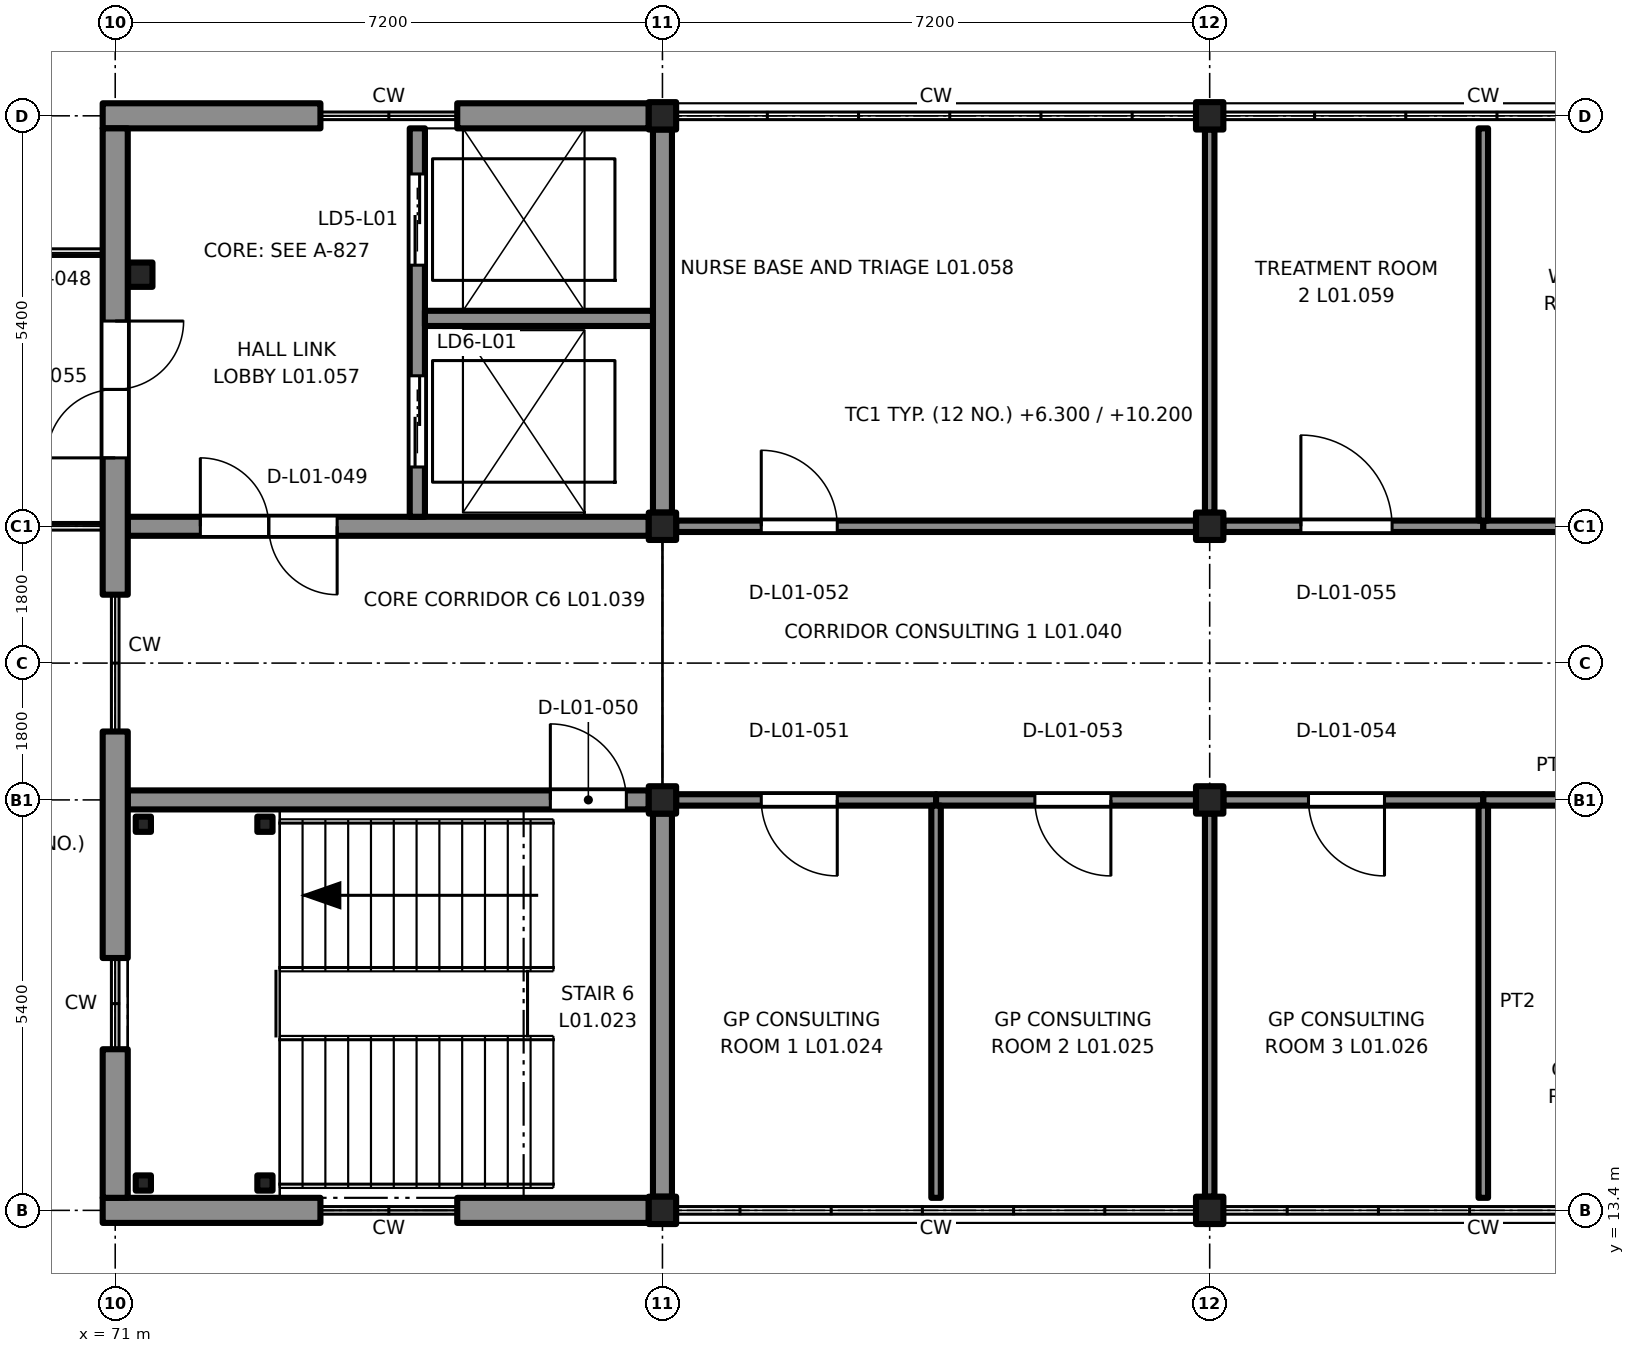
"""IFC4 building model, lengths in metres.
Left out: names, types, materials, properties, quantities, classifications, styles, units other than length and angle.
Written with IfcOpenShell. Run it as: python <this file> out.ifc"""

import sys

from ifc_helpers import new_model, si_unit, direction, frame, frame_2d, origin, origin_2d, place, context, subcontext, project, spatial, rectangle, extrude, element, fill, save


model = new_model("IFC4")
c1 = context("Model", 3, precision=1e-05, world=origin(), true_north=direction((0.0, 1.0)))
c2 = subcontext(c1, "Body", "Model", "MODEL_VIEW")
j1 = project(units=[si_unit("LENGTHUNIT", "METRE"), si_unit("PLANEANGLEUNIT", "RADIAN")], contexts=[c1])
p1 = place(None, origin())
s1 = spatial("IfcSite", under=j1, at=p1, CompositionType="ELEMENT")
p2 = place(p1, origin())
s2 = spatial("IfcBuilding", under=s1, at=p2, CompositionType="ELEMENT")
p3 = place(p2, frame((0.0, 0.0, 6.3)))
s3 = spatial("IfcBuildingStorey", under=s2, at=p3, CompositionType="ELEMENT", Elevation=6.3)
for number, where, z_axis, x_axis in (
    (1, (78.2, 13.4, 0.0), (0.0, 0.0, 1.0), (1.0, 0.0, 0.0)),
    (2, (78.2, 18.8, 0.0), (0.0, 0.0, 1.0), (1.0, 0.0, 0.0)),
    (3, (78.2, 22.4, 0.0), (0.0, 0.0, 1.0), (1.0, 0.0, 0.0)),
    (4, (78.2, 27.8, 0.0), (0.0, 0.0, 1.0), (1.0, 0.0, 0.0)),
    (5, (85.4, 13.4, 0.0), (0.0, 0.0, 1.0), (1.0, 0.0, 0.0)),
    (6, (85.4, 18.8, 0.0), (0.0, 0.0, 1.0), (1.0, 0.0, 0.0)),
    (7, (85.4, 22.4, 0.0), (0.0, 0.0, 1.0), (1.0, 0.0, 0.0)),
    (8, (85.4, 27.8, 0.0), (0.0, 0.0, 1.0), (1.0, 0.0, 0.0)),
):
    element("IfcColumn", number, at=place(p3, frame(where, z_axis=z_axis, x_axis=x_axis)), inside=s3, PredefinedType="COLUMN", context=c2, shape_type="SweptSolid", body=[
        extrude(rectangle(XDim=0.36, YDim=0.36, at=origin_2d()), origin(), (0.0, 0.0, 1.0), 3.9),
    ])
p4 = place(p3, frame((71.33, 25.71, 0.0), z_axis=(0.0, 0.0, 1.0), x_axis=(1.0, 0.0, 0.0)))
e9 = element("IfcColumn", 9, at=p4, inside=s3, PredefinedType="COLUMN", context=c2, shape_type="SweptSolid", body=[
    extrude(rectangle(XDim=0.32, YDim=0.32, at=origin_2d()), origin(), (0.0, 0.0, 1.0), 2.505),
])
p5 = place(p3, frame((71.165, 18.8, 0.0), z_axis=(0.0, 0.0, 1.0), x_axis=(1.0, 0.0, 0.0)))
e10 = element("IfcWall", 10, at=p5, inside=s3, PredefinedType="SHEAR", context=c2, shape_type="SweptSolid", body=[
    extrude(rectangle(XDim=6.855, YDim=0.25, at=frame_2d((3.427, 0.0))), origin(), (0.0, 0.0, 1.0), 3.65),
])
p6 = place(p5, frame((5.56, 0.0, 0.0)))
e11 = element("IfcOpeningElement", 11, at=p6, cuts=e10, PredefinedType="OPENING", context=c2, shape_type="SweptSolid", body=[
    extrude(rectangle(XDim=1.0, YDim=2.1, at=frame_2d((0.5, 1.05))), frame((0.0, 0.135, 0.0), z_axis=(0.0, -1.0, 0.0), x_axis=(1.0, 0.0, 0.0)), (0.0, 0.0, 1.0), 0.27),
])
p7 = place(p3, frame((78.2, 13.58, 0.0), z_axis=(0.0, 0.0, 1.0), x_axis=(0.0, 1.0, 0.0)))
e12 = element("IfcWall", 12, at=p7, inside=s3, PredefinedType="SHEAR", context=c2, shape_type="SweptSolid", body=[
    extrude(rectangle(XDim=5.04, YDim=0.25, at=frame_2d((2.52, 0.0))), origin(), (0.0, 0.0, 1.0), 3.65),
])
p8 = place(p3, frame((71.165, 22.4, 0.0), z_axis=(0.0, 0.0, 1.0), x_axis=(1.0, 0.0, 0.0)))
e13 = element("IfcWall", 13, at=p8, inside=s3, PredefinedType="SHEAR", context=c2, shape_type="SweptSolid", body=[
    extrude(rectangle(XDim=6.855, YDim=0.25, at=frame_2d((3.427, 0.0))), origin(), (0.0, 0.0, 1.0), 3.65),
])
p9 = place(p8, frame((0.955, 0.0, 0.0)))
e14 = element("IfcOpeningElement", 14, at=p9, cuts=e13, PredefinedType="OPENING", context=c2, shape_type="SweptSolid", body=[
    extrude(rectangle(XDim=1.8, YDim=2.1, at=frame_2d((0.9, 1.05))), frame((0.0, 0.135, 0.0), z_axis=(0.0, -1.0, 0.0), x_axis=(1.0, 0.0, 0.0)), (0.0, 0.0, 1.0), 0.27),
])
p10 = place(p3, frame((78.2, 22.58, 0.0), z_axis=(0.0, 0.0, 1.0), x_axis=(0.0, 1.0, 0.0)))
e15 = element("IfcWall", 15, at=p10, inside=s3, PredefinedType="SHEAR", context=c2, shape_type="SweptSolid", body=[
    extrude(rectangle(XDim=5.04, YDim=0.25, at=frame_2d((2.52, 0.0))), origin(), (0.0, 0.0, 1.0), 3.65),
])
p11 = place(p3, frame((74.975, 22.525, 0.0), z_axis=(0.0, 0.0, 1.0), x_axis=(0.0, 1.0, 0.0)))
e16 = element("IfcWall", 16, at=p11, inside=s3, PredefinedType="SHEAR", context=c2, shape_type="SweptSolid", body=[
    extrude(rectangle(XDim=5.11, YDim=0.2, at=frame_2d((2.555, 0.0))), origin(), (0.0, 0.0, 1.0), 3.65),
])
p12 = place(p11, frame((3.31, 0.0, 0.0)))
e17 = element("IfcOpeningElement", 17, at=p12, cuts=e16, PredefinedType="OPENING", context=c2, shape_type="SweptSolid", body=[
    extrude(rectangle(XDim=1.2, YDim=2.1, at=frame_2d((0.6, 1.05))), frame((0.0, 0.11, 0.0), z_axis=(0.0, -1.0, 0.0), x_axis=(1.0, 0.0, 0.0)), (0.0, 0.0, 1.0), 0.22),
])
p13 = place(p11, frame((0.655, 0.0, 0.0)))
e18 = element("IfcOpeningElement", 18, at=p13, cuts=e16, PredefinedType="OPENING", context=c2, shape_type="SweptSolid", body=[
    extrude(rectangle(XDim=1.2, YDim=2.1, at=frame_2d((0.6, 1.05))), frame((0.0, 0.11, 0.0), z_axis=(0.0, -1.0, 0.0), x_axis=(1.0, 0.0, 0.0)), (0.0, 0.0, 1.0), 0.22),
])
p14 = place(p3, frame((78.075, 25.135, 0.0), z_axis=(0.0, 0.0, 1.0), x_axis=(-1.0, 0.0, 0.0)))
e19 = element("IfcWall", 19, at=p14, inside=s3, PredefinedType="SHEAR", context=c2, shape_type="SweptSolid", body=[
    extrude(rectangle(XDim=3.0, YDim=0.2, at=frame_2d((1.5, 0.0))), origin(), (0.0, 0.0, 1.0), 3.65),
])
for number, where, z_axis, x_axis in (
    (20, (71.37, 13.76, 0.0), (0.0, 0.0, 1.0), (1.0, 0.0, 0.0)),
    (21, (71.37, 18.48, 0.0), (0.0, 0.0, 1.0), (1.0, 0.0, 0.0)),
    (22, (72.97, 13.76, 0.0), (0.0, 0.0, 1.0), (1.0, 0.0, 0.0)),
    (23, (72.97, 18.48, 0.0), (0.0, 0.0, 1.0), (1.0, 0.0, 0.0)),
):
    element("IfcColumn", number, at=place(p3, frame(where, z_axis=z_axis, x_axis=x_axis)), inside=s3, PredefinedType="COLUMN", context=c2, shape_type="SweptSolid", body=[
        extrude(rectangle(XDim=0.2, YDim=0.2, at=origin_2d()), origin(), (0.0, 0.0, 1.0), 3.9),
    ])
p15 = place(p3, frame((73.7, 13.4, 0.0), z_axis=(0.0, 0.0, 1.0), x_axis=(-1.0, 0.0, 0.0)))
e24 = element("IfcWall", 24, at=p15, inside=s3, PredefinedType="SOLIDWALL", context=c2, shape_type="SweptSolid", body=[
    extrude(rectangle(XDim=2.865, YDim=0.33, at=frame_2d((1.433, 0.0))), origin(), (0.0, 0.0, 1.0), 3.22),
])
p16 = place(p3, frame((78.02, 13.4, 0.0), z_axis=(0.0, 0.0, 1.0), x_axis=(-1.0, 0.0, 0.0)))
e25 = element("IfcWall", 25, at=p16, inside=s3, PredefinedType="SOLIDWALL", context=c2, shape_type="SweptSolid", body=[
    extrude(rectangle(XDim=2.52, YDim=0.33, at=frame_2d((1.26, 0.0))), origin(), (0.0, 0.0, 1.0), 3.22),
])
p17 = place(p3, frame((70.835, 27.8, 0.0), z_axis=(0.0, 0.0, 1.0), x_axis=(1.0, 0.0, 0.0)))
e26 = element("IfcWall", 26, at=p17, inside=s3, PredefinedType="SOLIDWALL", context=c2, shape_type="SweptSolid", body=[
    extrude(rectangle(XDim=2.865, YDim=0.33, at=frame_2d((1.433, 0.0))), origin(), (0.0, 0.0, 1.0), 3.22),
])
p18 = place(p3, frame((75.5, 27.8, 0.0), z_axis=(0.0, 0.0, 1.0), x_axis=(1.0, 0.0, 0.0)))
e27 = element("IfcWall", 27, at=p18, inside=s3, PredefinedType="SOLIDWALL", context=c2, shape_type="SweptSolid", body=[
    extrude(rectangle(XDim=2.52, YDim=0.33, at=frame_2d((1.26, 0.0))), origin(), (0.0, 0.0, 1.0), 3.22),
])
p19 = place(p3, frame((71.0, 13.565, 0.0), z_axis=(0.0, 0.0, 1.0), x_axis=(0.0, 1.0, 0.0)))
e28 = element("IfcWall", 28, at=p19, inside=s3, PredefinedType="SOLIDWALL", context=c2, shape_type="SweptSolid", body=[
    extrude(rectangle(XDim=1.955, YDim=0.33, at=frame_2d((0.978, 0.0))), origin(), (0.0, 0.0, 1.0), 3.2),
])
p20 = place(p3, frame((71.0, 16.72, 0.0), z_axis=(0.0, 0.0, 1.0), x_axis=(0.0, 1.0, 0.0)))
e29 = element("IfcWall", 29, at=p20, inside=s3, PredefinedType="SOLIDWALL", context=c2, shape_type="SweptSolid", body=[
    extrude(rectangle(XDim=2.98, YDim=0.33, at=frame_2d((1.49, 0.0))), origin(), (0.0, 0.0, 1.0), 3.2),
])
p21 = place(p3, frame((71.0, 21.5, 0.0), z_axis=(0.0, 0.0, 1.0), x_axis=(0.0, 1.0, 0.0)))
e30 = element("IfcWall", 30, at=p21, inside=s3, PredefinedType="SOLIDWALL", context=c2, shape_type="SweptSolid", body=[
    extrude(rectangle(XDim=6.135, YDim=0.33, at=frame_2d((3.067, 0.0))), origin(), (0.0, 0.0, 1.0), 3.2),
])
p22 = place(p21, frame((1.8, 0.0, 0.0)))
e31 = element("IfcOpeningElement", 31, at=p22, cuts=e30, PredefinedType="OPENING", context=c2, shape_type="SweptSolid", body=[
    extrude(rectangle(XDim=1.8, YDim=2.4, at=frame_2d((0.9, 1.2))), frame((0.0, 0.175, 0.0), z_axis=(0.0, -1.0, 0.0), x_axis=(1.0, 0.0, 0.0)), (0.0, 0.0, 1.0), 0.35),
])
p23 = place(p3, frame((81.8, 18.8, 0.0), z_axis=(0.0, 0.0, 1.0), x_axis=(-1.0, 0.0, 0.0)))
e32 = element("IfcWall", 32, at=p23, inside=s3, PredefinedType="PARTITIONING", context=c2, shape_type="SweptSolid", body=[
    extrude(rectangle(XDim=3.42, YDim=0.15, at=frame_2d((1.71, 0.0))), origin(), (0.0, 0.0, 1.0), 3.22),
])
p24 = place(p23, frame((1.3, 0.0, 0.0)))
e33 = element("IfcOpeningElement", 33, at=p24, cuts=e32, PredefinedType="OPENING", context=c2, shape_type="SweptSolid", body=[
    extrude(rectangle(XDim=1.0, YDim=2.1, at=frame_2d((0.5, 1.05))), frame((0.0, 0.085, 0.0), z_axis=(0.0, -1.0, 0.0), x_axis=(1.0, 0.0, 0.0)), (0.0, 0.0, 1.0), 0.17),
])
p25 = place(p3, frame((85.22, 18.8, 0.0), z_axis=(0.0, 0.0, 1.0), x_axis=(-1.0, 0.0, 0.0)))
e34 = element("IfcWall", 34, at=p25, inside=s3, PredefinedType="PARTITIONING", context=c2, shape_type="SweptSolid", body=[
    extrude(rectangle(XDim=3.42, YDim=0.15, at=frame_2d((1.71, 0.0))), origin(), (0.0, 0.0, 1.0), 3.22),
])
p26 = place(p25, frame((1.12, 0.0, 0.0)))
e35 = element("IfcOpeningElement", 35, at=p26, cuts=e34, PredefinedType="OPENING", context=c2, shape_type="SweptSolid", body=[
    extrude(rectangle(XDim=1.0, YDim=2.1, at=frame_2d((0.5, 1.05))), frame((0.0, 0.085, 0.0), z_axis=(0.0, -1.0, 0.0), x_axis=(1.0, 0.0, 0.0)), (0.0, 0.0, 1.0), 0.17),
])
p27 = place(p3, frame((81.8, 13.565, 0.0), z_axis=(0.0, 0.0, 1.0), x_axis=(0.0, 1.0, 0.0)))
e36 = element("IfcWall", 36, at=p27, inside=s3, PredefinedType="PARTITIONING", context=c2, shape_type="SweptSolid", body=[
    extrude(rectangle(XDim=5.16, YDim=0.125, at=frame_2d((2.58, 0.0))), origin(), (0.0, 0.0, 1.0), 3.38),
])
p28 = place(p3, frame((89.0, 18.8, 0.0), z_axis=(0.0, 0.0, 1.0), x_axis=(-1.0, 0.0, 0.0)))
e37 = element("IfcWall", 37, at=p28, inside=s3, PredefinedType="PARTITIONING", context=c2, shape_type="SweptSolid", body=[
    extrude(rectangle(XDim=3.42, YDim=0.15, at=frame_2d((1.71, 0.0))), origin(), (0.0, 0.0, 1.0), 3.22),
])
p29 = place(p28, frame((1.3, 0.0, 0.0)))
e38 = element("IfcOpeningElement", 38, at=p29, cuts=e37, PredefinedType="OPENING", context=c2, shape_type="SweptSolid", body=[
    extrude(rectangle(XDim=1.0, YDim=2.1, at=frame_2d((0.5, 1.05))), frame((0.0, 0.085, 0.0), z_axis=(0.0, -1.0, 0.0), x_axis=(1.0, 0.0, 0.0)), (0.0, 0.0, 1.0), 0.17),
])
p30 = place(p3, frame((85.4, 13.58, 0.0), z_axis=(0.0, 0.0, 1.0), x_axis=(0.0, 1.0, 0.0)))
e39 = element("IfcWall", 39, at=p30, inside=s3, PredefinedType="PARTITIONING", context=c2, shape_type="SweptSolid", body=[
    extrude(rectangle(XDim=5.04, YDim=0.125, at=frame_2d((2.52, 0.0))), origin(), (0.0, 0.0, 1.0), 3.38),
])
p31 = place(p3, frame((92.42, 18.8, 0.0), z_axis=(0.0, 0.0, 1.0), x_axis=(-1.0, 0.0, 0.0)))
e40 = element("IfcWall", 40, at=p31, inside=s3, PredefinedType="PARTITIONING", context=c2, shape_type="SweptSolid", body=[
    extrude(rectangle(XDim=3.42, YDim=0.15, at=frame_2d((1.71, 0.0))), origin(), (0.0, 0.0, 1.0), 3.22),
])
p32 = place(p31, frame((1.12, 0.0, 0.0)))
e41 = element("IfcOpeningElement", 41, at=p32, cuts=e40, PredefinedType="OPENING", context=c2, shape_type="SweptSolid", body=[
    extrude(rectangle(XDim=1.0, YDim=2.1, at=frame_2d((0.5, 1.05))), frame((0.0, 0.085, 0.0), z_axis=(0.0, -1.0, 0.0), x_axis=(1.0, 0.0, 0.0)), (0.0, 0.0, 1.0), 0.17),
])
p33 = place(p3, frame((89.0, 13.565, 0.0), z_axis=(0.0, 0.0, 1.0), x_axis=(0.0, 1.0, 0.0)))
e42 = element("IfcWall", 42, at=p33, inside=s3, PredefinedType="PARTITIONING", context=c2, shape_type="SweptSolid", body=[
    extrude(rectangle(XDim=5.16, YDim=0.125, at=frame_2d((2.58, 0.0))), origin(), (0.0, 0.0, 1.0), 3.38),
])
p34 = place(p3, frame((78.38, 22.4, 0.0), z_axis=(0.0, 0.0, 1.0), x_axis=(1.0, 0.0, 0.0)))
e43 = element("IfcWall", 43, at=p34, inside=s3, PredefinedType="PARTITIONING", context=c2, shape_type="SweptSolid", body=[
    extrude(rectangle(XDim=6.84, YDim=0.15, at=frame_2d((3.42, 0.0))), origin(), (0.0, 0.0, 1.0), 3.22),
])
p35 = place(p34, frame((1.12, 0.0, 0.0)))
e44 = element("IfcOpeningElement", 44, at=p35, cuts=e43, PredefinedType="OPENING", context=c2, shape_type="SweptSolid", body=[
    extrude(rectangle(XDim=1.0, YDim=2.1, at=frame_2d((0.5, 1.05))), frame((0.0, 0.085, 0.0), z_axis=(0.0, -1.0, 0.0), x_axis=(1.0, 0.0, 0.0)), (0.0, 0.0, 1.0), 0.17),
])
p36 = place(p3, frame((85.58, 22.4, 0.0), z_axis=(0.0, 0.0, 1.0), x_axis=(1.0, 0.0, 0.0)))
e45 = element("IfcWall", 45, at=p36, inside=s3, PredefinedType="PARTITIONING", context=c2, shape_type="SweptSolid", body=[
    extrude(rectangle(XDim=3.42, YDim=0.15, at=frame_2d((1.71, 0.0))), origin(), (0.0, 0.0, 1.0), 3.22),
])
p37 = place(p36, frame((1.02, 0.0, 0.0)))
e46 = element("IfcOpeningElement", 46, at=p37, cuts=e45, PredefinedType="OPENING", context=c2, shape_type="SweptSolid", body=[
    extrude(rectangle(XDim=1.2, YDim=2.1, at=frame_2d((0.6, 1.05))), frame((0.0, 0.085, 0.0), z_axis=(0.0, -1.0, 0.0), x_axis=(1.0, 0.0, 0.0)), (0.0, 0.0, 1.0), 0.17),
])
p38 = place(p3, frame((85.4, 27.62, 0.0), z_axis=(0.0, 0.0, 1.0), x_axis=(0.0, -1.0, 0.0)))
e47 = element("IfcWall", 47, at=p38, inside=s3, PredefinedType="PARTITIONING", context=c2, shape_type="SweptSolid", body=[
    extrude(rectangle(XDim=5.04, YDim=0.125, at=frame_2d((2.52, 0.0))), origin(), (0.0, 0.0, 1.0), 3.38),
])
p39 = place(p3, frame((89.0, 22.4, 0.0), z_axis=(0.0, 0.0, 1.0), x_axis=(1.0, 0.0, 0.0)))
e48 = element("IfcWall", 48, at=p39, inside=s3, PredefinedType="PARTITIONING", context=c2, shape_type="SweptSolid", body=[
    extrude(rectangle(XDim=3.42, YDim=0.15, at=frame_2d((1.71, 0.0))), origin(), (0.0, 0.0, 1.0), 3.22),
])
p40 = place(p39, frame((1.3, 0.0, 0.0)))
e49 = element("IfcOpeningElement", 49, at=p40, cuts=e48, PredefinedType="OPENING", context=c2, shape_type="SweptSolid", body=[
    extrude(rectangle(XDim=1.0, YDim=2.1, at=frame_2d((0.5, 1.05))), frame((0.0, 0.085, 0.0), z_axis=(0.0, -1.0, 0.0), x_axis=(1.0, 0.0, 0.0)), (0.0, 0.0, 1.0), 0.17),
])
p41 = place(p3, frame((89.0, 27.635, 0.0), z_axis=(0.0, 0.0, 1.0), x_axis=(0.0, -1.0, 0.0)))
e50 = element("IfcWall", 50, at=p41, inside=s3, PredefinedType="PARTITIONING", context=c2, shape_type="SweptSolid", body=[
    extrude(rectangle(XDim=5.16, YDim=0.125, at=frame_2d((2.58, 0.0))), origin(), (0.0, 0.0, 1.0), 3.38),
])
p42 = place(p6, origin())
e51 = element("IfcDoor", 51, at=p42, inside=s3, OperationType="SINGLE_SWING_RIGHT", PredefinedType="DOOR", context=c2, shape_type="SweptSolid", body=[
    extrude(rectangle(XDim=1.0, YDim=2.1, at=frame_2d((0.5, 1.05))), frame((0.0, 0.025, 0.0), z_axis=(0.0, -1.0, 0.0), x_axis=(1.0, 0.0, 0.0)), (0.0, 0.0, 1.0), 0.05),
])
fill(e11, e51)
p43 = place(p9, origin())
e52 = element("IfcDoor", 52, at=p43, inside=s3, OperationType="DOUBLE_DOOR_SINGLE_SWING", PredefinedType="DOOR", context=c2, shape_type="SweptSolid", body=[
    extrude(rectangle(XDim=1.8, YDim=2.1, at=frame_2d((0.9, 1.05))), frame((0.0, 0.025, 0.0), z_axis=(0.0, -1.0, 0.0), x_axis=(1.0, 0.0, 0.0)), (0.0, 0.0, 1.0), 0.05),
])
fill(e14, e52)
p44 = place(p12, origin())
e53 = element("IfcDoor", 53, at=p44, inside=s3, OperationType="DOUBLE_DOOR_SLIDING", PredefinedType="DOOR", context=c2, shape_type="SweptSolid", body=[
    extrude(rectangle(XDim=1.2, YDim=2.1, at=frame_2d((0.6, 1.05))), frame((0.0, 0.025, 0.0), z_axis=(0.0, -1.0, 0.0), x_axis=(1.0, 0.0, 0.0)), (0.0, 0.0, 1.0), 0.05),
])
fill(e17, e53)
p45 = place(p13, origin())
e54 = element("IfcDoor", 54, at=p45, inside=s3, OperationType="DOUBLE_DOOR_SLIDING", PredefinedType="DOOR", context=c2, shape_type="SweptSolid", body=[
    extrude(rectangle(XDim=1.2, YDim=2.1, at=frame_2d((0.6, 1.05))), frame((0.0, 0.025, 0.0), z_axis=(0.0, -1.0, 0.0), x_axis=(1.0, 0.0, 0.0)), (0.0, 0.0, 1.0), 0.05),
])
fill(e18, e54)
p46 = place(p22, origin())
e55 = element("IfcDoor", 55, at=p46, inside=s3, OperationType="DOUBLE_DOOR_SINGLE_SWING", PredefinedType="DOOR", context=c2, shape_type="SweptSolid", body=[
    extrude(rectangle(XDim=1.8, YDim=2.4, at=frame_2d((0.9, 1.2))), frame((0.0, 0.025, 0.0), z_axis=(0.0, -1.0, 0.0), x_axis=(1.0, 0.0, 0.0)), (0.0, 0.0, 1.0), 0.05),
])
fill(e31, e55)
p47 = place(p24, origin())
e56 = element("IfcDoor", 56, at=p47, inside=s3, OperationType="SINGLE_SWING_RIGHT", PredefinedType="DOOR", context=c2, shape_type="SweptSolid", body=[
    extrude(rectangle(XDim=1.0, YDim=2.1, at=frame_2d((0.5, 1.05))), frame((0.0, 0.025, 0.0), z_axis=(0.0, -1.0, 0.0), x_axis=(1.0, 0.0, 0.0)), (0.0, 0.0, 1.0), 0.05),
])
fill(e33, e56)
p48 = place(p26, origin())
e57 = element("IfcDoor", 57, at=p48, inside=s3, OperationType="SINGLE_SWING_LEFT", PredefinedType="DOOR", context=c2, shape_type="SweptSolid", body=[
    extrude(rectangle(XDim=1.0, YDim=2.1, at=frame_2d((0.5, 1.05))), frame((0.0, 0.025, 0.0), z_axis=(0.0, -1.0, 0.0), x_axis=(1.0, 0.0, 0.0)), (0.0, 0.0, 1.0), 0.05),
])
fill(e35, e57)
p49 = place(p29, origin())
e58 = element("IfcDoor", 58, at=p49, inside=s3, OperationType="SINGLE_SWING_RIGHT", PredefinedType="DOOR", context=c2, shape_type="SweptSolid", body=[
    extrude(rectangle(XDim=1.0, YDim=2.1, at=frame_2d((0.5, 1.05))), frame((0.0, 0.025, 0.0), z_axis=(0.0, -1.0, 0.0), x_axis=(1.0, 0.0, 0.0)), (0.0, 0.0, 1.0), 0.05),
])
fill(e38, e58)
p50 = place(p35, origin())
e59 = element("IfcDoor", 59, at=p50, inside=s3, OperationType="SINGLE_SWING_LEFT", PredefinedType="DOOR", context=c2, shape_type="SweptSolid", body=[
    extrude(rectangle(XDim=1.0, YDim=2.1, at=frame_2d((0.5, 1.05))), frame((0.0, 0.025, 0.0), z_axis=(0.0, -1.0, 0.0), x_axis=(1.0, 0.0, 0.0)), (0.0, 0.0, 1.0), 0.05),
])
fill(e44, e59)
p51 = place(p37, origin())
e60 = element("IfcDoor", 60, at=p51, inside=s3, OperationType="SINGLE_SWING_LEFT", PredefinedType="DOOR", context=c2, shape_type="SweptSolid", body=[
    extrude(rectangle(XDim=1.2, YDim=2.1, at=frame_2d((0.6, 1.05))), frame((0.0, 0.025, 0.0), z_axis=(0.0, -1.0, 0.0), x_axis=(1.0, 0.0, 0.0)), (0.0, 0.0, 1.0), 0.05),
])
fill(e46, e60)
save(model, sys.argv[1])
